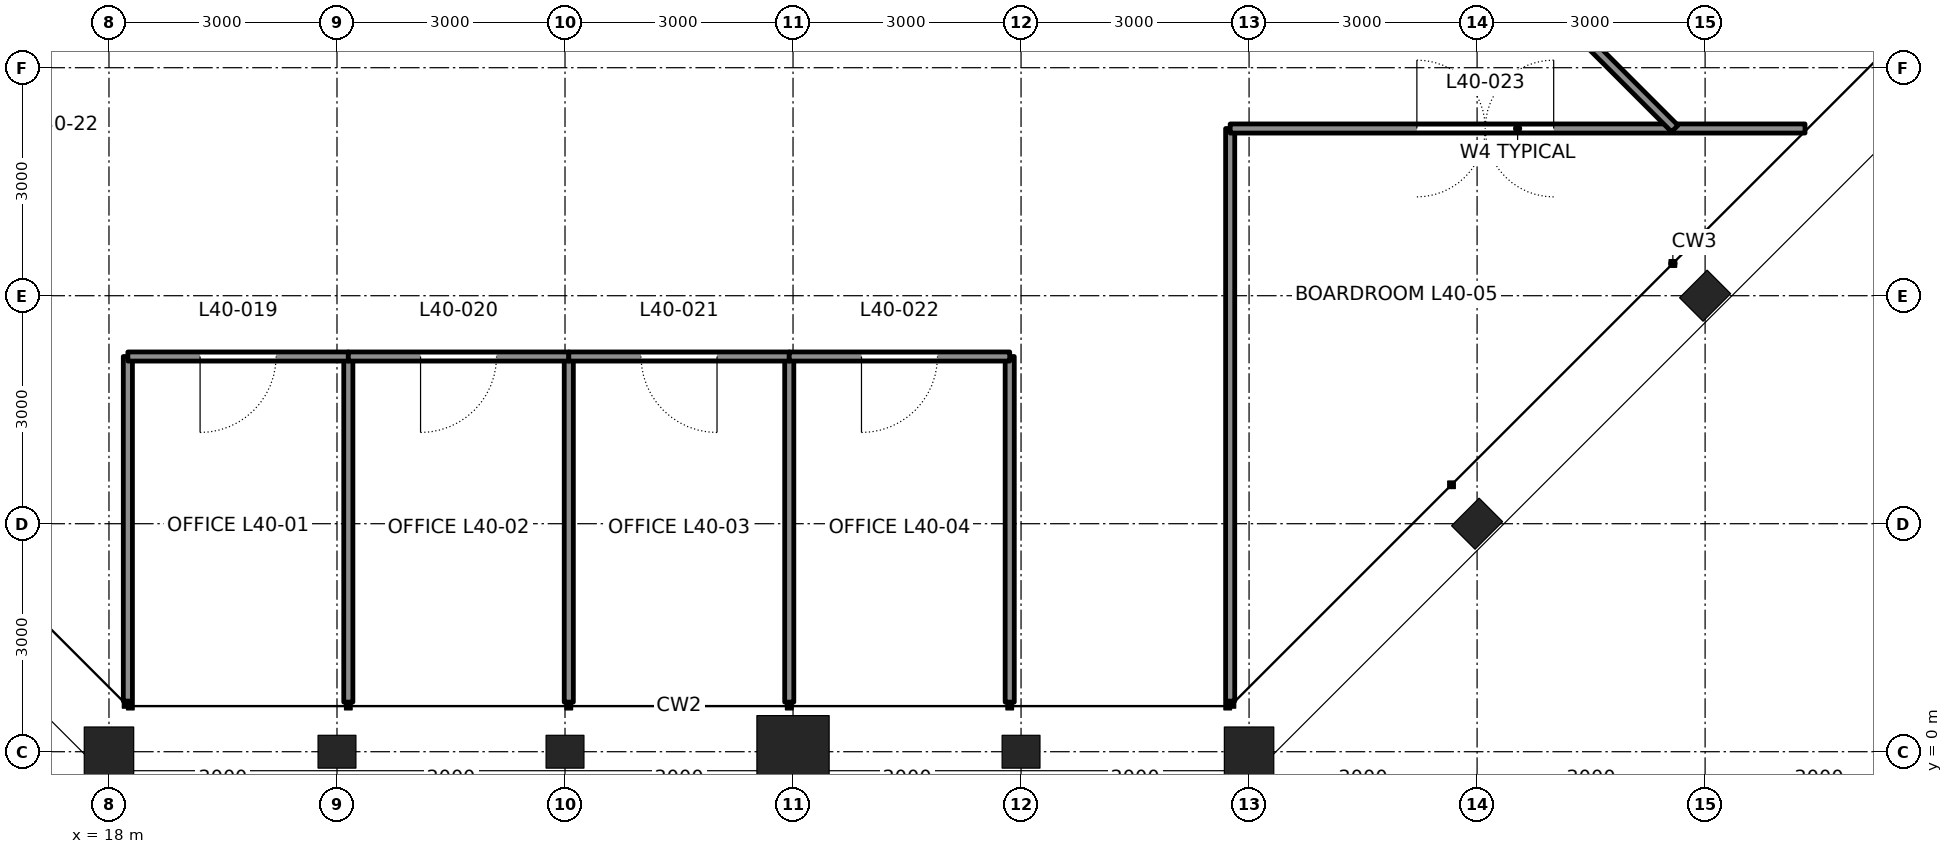
"""IFC4 building model, lengths in metres.
Left out: names, types, materials, properties, quantities, classifications, styles, units other than length and angle.
Written with IfcOpenShell. Run it as: python <this file> out.ifc"""

import sys

from ifc_helpers import new_model, si_unit, direction, frame, frame_2d, origin, origin_2d, place, context, subcontext, project, spatial, rectangle, hollow_rectangle, i_section, extrude, element, fill, save


model = new_model("IFC4")
c1 = context("Model", 3, precision=1e-05, world=origin(), true_north=direction((0.0, 1.0)))
c2 = subcontext(c1, "Body", "Model", "MODEL_VIEW")
j1 = project(units=[si_unit("LENGTHUNIT", "METRE"), si_unit("PLANEANGLEUNIT", "RADIAN")], contexts=[c1])
p1 = place(None, origin())
s1 = spatial("IfcSite", under=j1, at=p1, CompositionType="ELEMENT")
p2 = place(p1, origin())
s2 = spatial("IfcBuilding", under=s1, at=p2, CompositionType="ELEMENT")
p3 = place(p2, frame((0.0, 0.0, 184.5)))
s3 = spatial("IfcBuildingStorey", under=s2, at=p3, CompositionType="ELEMENT", Elevation=184.5)
p4 = place(p3, frame((18.0, 0.0, 0.0), z_axis=(0.0, 0.0, 1.0), x_axis=(0.0, -1.0, 0.0)))
e1 = element("IfcColumn", 1, at=p4, inside=s3, PredefinedType="COLUMN", context=c2, shape_type="SweptSolid", body=[
    extrude(hollow_rectangle(XDim=0.65, YDim=0.65, WallThickness=0.065, at=origin_2d()), origin(), (0.0, 0.0, 1.0), 4.2),
])
for number, where, z_axis, x_axis in (
    (2, (21.0, 0.0, 0.0), (0.0, 0.0, 1.0), (0.0, -1.0, 0.0)),
    (3, (24.0, 0.0, 0.0), (0.0, 0.0, 1.0), (0.0, -1.0, 0.0)),
):
    element("IfcColumn", number, at=place(p3, frame(where, z_axis=z_axis, x_axis=x_axis)), inside=s3, PredefinedType="COLUMN", context=c2, shape_type="SweptSolid", body=[
        extrude(i_section(OverallWidth=0.432, OverallDepth=0.498, WebThickness=0.056, FlangeThickness=0.089, at=origin_2d()), origin(), (0.0, 0.0, 1.0), 4.2),
    ])
p5 = place(p3, frame((27.0, 0.0, 0.0), z_axis=(0.0, 0.0, 1.0), x_axis=(0.0, -1.0, 0.0)))
e4 = element("IfcColumn", 4, at=p5, inside=s3, PredefinedType="COLUMN", context=c2, shape_type="SweptSolid", body=[
    extrude(hollow_rectangle(XDim=0.95, YDim=0.95, WallThickness=0.11, at=origin_2d()), origin(), (0.0, 0.0, 1.0), 4.2),
])
p6 = place(p3, frame((30.0, 0.0, 0.0), z_axis=(0.0, 0.0, 1.0), x_axis=(0.0, -1.0, 0.0)))
e5 = element("IfcColumn", 5, at=p6, inside=s3, PredefinedType="COLUMN", context=c2, shape_type="SweptSolid", body=[
    extrude(i_section(OverallWidth=0.432, OverallDepth=0.498, WebThickness=0.056, FlangeThickness=0.089, at=origin_2d()), origin(), (0.0, 0.0, 1.0), 4.2),
])
p7 = place(p3, frame((33.0, 0.0, 0.0), z_axis=(0.0, 0.0, 1.0), x_axis=(0.0, -1.0, 0.0)))
e6 = element("IfcColumn", 6, at=p7, inside=s3, PredefinedType="COLUMN", context=c2, shape_type="SweptSolid", body=[
    extrude(hollow_rectangle(XDim=0.65, YDim=0.65, WallThickness=0.065, at=origin_2d()), origin(), (0.0, 0.0, 1.0), 4.2),
])
for number, where, z_axis, x_axis in (
    (7, (36.0, 3.0, 0.0), (0.0, 0.0, 1.0), (0.707, -0.707, 0.0)),
    (8, (39.0, 6.0, 0.0), (0.0, 0.0, 1.0), (0.707, -0.707, 0.0)),
):
    element("IfcColumn", number, at=place(p3, frame(where, z_axis=z_axis, x_axis=x_axis)), inside=s3, PredefinedType="COLUMN", context=c2, shape_type="SweptSolid", body=[
        extrude(i_section(OverallWidth=0.437, OverallDepth=0.513, WebThickness=0.061, FlangeThickness=0.097, at=origin_2d()), origin(), (0.0, 0.0, 1.0), 4.2),
    ])
p8 = place(p3, frame((18.249, 0.666, 0.0), z_axis=(0.0, 0.0, 1.0), x_axis=(0.0, 1.0, 0.0)))
e9 = element("IfcWall", 9, at=p8, inside=s3, PredefinedType="PARTITIONING", context=c2, shape_type="SweptSolid", body=[
    extrude(rectangle(XDim=4.534, YDim=0.12, at=frame_2d((2.267, 0.0))), origin(), (0.0, 0.0, 1.0), 4.04),
])
p9 = place(p3, frame((21.149, 0.653, 0.0), z_axis=(0.0, 0.0, 1.0), x_axis=(0.0, 1.0, 0.0)))
e10 = element("IfcWall", 10, at=p9, inside=s3, PredefinedType="PARTITIONING", context=c2, shape_type="SweptSolid", body=[
    extrude(rectangle(XDim=4.547, YDim=0.12, at=frame_2d((2.274, 0.0))), origin(), (0.0, 0.0, 1.0), 4.04),
])
for number, where, z_axis, x_axis in (
    (11, (24.05, 0.653, 0.0), (0.0, 0.0, 1.0), (0.0, 1.0, 0.0)),
    (12, (26.95, 0.653, 0.0), (0.0, 0.0, 1.0), (0.0, 1.0, 0.0)),
):
    element("IfcWall", number, at=place(p3, frame(where, z_axis=z_axis, x_axis=x_axis)), inside=s3, PredefinedType="PARTITIONING", context=c2, shape_type="SweptSolid", body=[
        extrude(rectangle(XDim=4.547, YDim=0.12, at=frame_2d((2.274, 0.0))), origin(), (0.0, 0.0, 1.0), 3.357),
    ])
p10 = place(p3, frame((29.851, 0.653, 0.0), z_axis=(0.0, 0.0, 1.0), x_axis=(0.0, 1.0, 0.0)))
e13 = element("IfcWall", 13, at=p10, inside=s3, PredefinedType="PARTITIONING", context=c2, shape_type="SweptSolid", body=[
    extrude(rectangle(XDim=4.547, YDim=0.12, at=frame_2d((2.274, 0.0))), origin(), (0.0, 0.0, 1.0), 4.04),
])
p11 = place(p3, frame((32.751, 0.666, 0.0), z_axis=(0.0, 0.0, 1.0), x_axis=(0.0, 1.0, 0.0)))
e14 = element("IfcWall", 14, at=p11, inside=s3, PredefinedType="PARTITIONING", context=c2, shape_type="SweptSolid", body=[
    extrude(rectangle(XDim=7.534, YDim=0.12, at=frame_2d((3.767, 0.0))), origin(), (0.0, 0.0, 1.0), 4.04),
])
p12 = place(p3, frame((18.249, 5.2, 0.0), z_axis=(0.0, 0.0, 1.0), x_axis=(1.0, 0.0, 0.0)))
e15 = element("IfcWall", 15, at=p12, inside=s3, PredefinedType="PARTITIONING", context=c2, shape_type="SweptSolid", body=[
    extrude(rectangle(XDim=2.901, YDim=0.12, at=frame_2d((1.45, 0.0))), origin(), (0.0, 0.0, 1.0), 4.04),
])
p13 = place(p12, frame((0.95, 0.0, 0.0)))
e16 = element("IfcOpeningElement", 16, at=p13, cuts=e15, PredefinedType="OPENING", context=c2, shape_type="SweptSolid", body=[
    extrude(rectangle(XDim=1.0, YDim=2.4, at=frame_2d((0.5, 1.2))), frame((0.0, 0.07, 0.0), z_axis=(0.0, -1.0, 0.0), x_axis=(1.0, 0.0, 0.0)), (0.0, 0.0, 1.0), 0.14),
])
p14 = place(p3, frame((21.149, 5.2, 0.0), z_axis=(0.0, 0.0, 1.0), x_axis=(1.0, 0.0, 0.0)))
e17 = element("IfcWall", 17, at=p14, inside=s3, PredefinedType="PARTITIONING", context=c2, shape_type="SweptSolid", body=[
    extrude(rectangle(XDim=2.901, YDim=0.12, at=frame_2d((1.45, 0.0))), origin(), (0.0, 0.0, 1.0), 4.04),
])
p15 = place(p14, frame((0.95, 0.0, 0.0)))
e18 = element("IfcOpeningElement", 18, at=p15, cuts=e17, PredefinedType="OPENING", context=c2, shape_type="SweptSolid", body=[
    extrude(rectangle(XDim=1.0, YDim=2.4, at=frame_2d((0.5, 1.2))), frame((0.0, 0.07, 0.0), z_axis=(0.0, -1.0, 0.0), x_axis=(1.0, 0.0, 0.0)), (0.0, 0.0, 1.0), 0.14),
])
p16 = place(p3, frame((24.05, 5.2, 0.0), z_axis=(0.0, 0.0, 1.0), x_axis=(1.0, 0.0, 0.0)))
e19 = element("IfcWall", 19, at=p16, inside=s3, PredefinedType="PARTITIONING", context=c2, shape_type="SweptSolid", body=[
    extrude(rectangle(XDim=2.9, YDim=0.12, at=frame_2d((1.45, 0.0))), origin(), (0.0, 0.0, 1.0), 4.04),
])
p17 = place(p16, frame((0.95, 0.0, 0.0)))
e20 = element("IfcOpeningElement", 20, at=p17, cuts=e19, PredefinedType="OPENING", context=c2, shape_type="SweptSolid", body=[
    extrude(rectangle(XDim=1.0, YDim=2.4, at=frame_2d((0.5, 1.2))), frame((0.0, 0.07, 0.0), z_axis=(0.0, -1.0, 0.0), x_axis=(1.0, 0.0, 0.0)), (0.0, 0.0, 1.0), 0.14),
])
p18 = place(p3, frame((26.95, 5.2, 0.0), z_axis=(0.0, 0.0, 1.0), x_axis=(1.0, 0.0, 0.0)))
e21 = element("IfcWall", 21, at=p18, inside=s3, PredefinedType="PARTITIONING", context=c2, shape_type="SweptSolid", body=[
    extrude(rectangle(XDim=2.901, YDim=0.12, at=frame_2d((1.45, 0.0))), origin(), (0.0, 0.0, 1.0), 4.04),
])
p19 = place(p18, frame((0.95, 0.0, 0.0)))
e22 = element("IfcOpeningElement", 22, at=p19, cuts=e21, PredefinedType="OPENING", context=c2, shape_type="SweptSolid", body=[
    extrude(rectangle(XDim=1.0, YDim=2.4, at=frame_2d((0.5, 1.2))), frame((0.0, 0.07, 0.0), z_axis=(0.0, -1.0, 0.0), x_axis=(1.0, 0.0, 0.0)), (0.0, 0.0, 1.0), 0.14),
])
p20 = place(p3, frame((32.751, 8.2, 0.0), z_axis=(0.0, 0.0, 1.0), x_axis=(1.0, 0.0, 0.0)))
e23 = element("IfcWall", 23, at=p20, inside=s3, PredefinedType="PARTITIONING", context=c2, shape_type="SweptSolid", body=[
    extrude(rectangle(XDim=7.563, YDim=0.12, at=frame_2d((3.781, 0.0))), origin(), (0.0, 0.0, 1.0), 4.04),
])
p21 = place(p20, frame((2.456, 0.0, 0.0)))
e24 = element("IfcOpeningElement", 24, at=p21, cuts=e23, PredefinedType="OPENING", context=c2, shape_type="SweptSolid", body=[
    extrude(rectangle(XDim=1.8, YDim=2.4, at=frame_2d((0.9, 1.2))), frame((0.0, 0.07, 0.0), z_axis=(0.0, -1.0, 0.0), x_axis=(1.0, 0.0, 0.0)), (0.0, 0.0, 1.0), 0.14),
])
p22 = place(p3, frame((34.8, 12.0, 0.0), z_axis=(0.0, 0.0, 1.0), x_axis=(0.707106781187, -0.707106781187, 0.0)))
e25 = element("IfcWall", 25, at=p22, inside=s3, PredefinedType="PARTITIONING", context=c2, shape_type="SweptSolid", body=[
    extrude(rectangle(XDim=5.375, YDim=0.12, at=frame_2d((2.688, 0.0))), origin(), (0.0, 0.0, 1.0), 4.04),
])
p23 = place(p22, frame((1.3, 0.0, 0.0)))
e26 = element("IfcOpeningElement", 26, at=p23, cuts=e25, PredefinedType="OPENING", context=c2, shape_type="SweptSolid", body=[
    extrude(rectangle(XDim=1.0, YDim=2.4, at=frame_2d((0.5, 1.2))), frame((0.0, 0.07, 0.0), z_axis=(0.0, -1.0, 0.0), x_axis=(1.0, 0.0, 0.0)), (0.0, 0.0, 1.0), 0.14),
])
p24 = place(p13, frame((1.0, 0.0, 0.0), z_axis=(0.0, 0.0, 1.0), x_axis=(-1.0, 0.0, 0.0)))
e27 = element("IfcDoor", 27, at=p24, inside=s3, OperationType="SINGLE_SWING_RIGHT", PredefinedType="DOOR", context=c2, shape_type="SweptSolid", body=[
    extrude(rectangle(XDim=1.0, YDim=2.4, at=frame_2d((0.5, 1.2))), frame((0.0, 0.025, 0.0), z_axis=(0.0, -1.0, 0.0), x_axis=(1.0, 0.0, 0.0)), (0.0, 0.0, 1.0), 0.05),
])
fill(e16, e27)
p25 = place(p15, frame((1.0, 0.0, 0.0), z_axis=(0.0, 0.0, 1.0), x_axis=(-1.0, 0.0, 0.0)))
e28 = element("IfcDoor", 28, at=p25, inside=s3, OperationType="SINGLE_SWING_RIGHT", PredefinedType="DOOR", context=c2, shape_type="SweptSolid", body=[
    extrude(rectangle(XDim=1.0, YDim=2.4, at=frame_2d((0.5, 1.2))), frame((0.0, 0.025, 0.0), z_axis=(0.0, -1.0, 0.0), x_axis=(1.0, 0.0, 0.0)), (0.0, 0.0, 1.0), 0.05),
])
fill(e18, e28)
p26 = place(p17, frame((1.0, 0.0, 0.0), z_axis=(0.0, 0.0, 1.0), x_axis=(-1.0, 0.0, 0.0)))
e29 = element("IfcDoor", 29, at=p26, inside=s3, OperationType="SINGLE_SWING_LEFT", PredefinedType="DOOR", context=c2, shape_type="SweptSolid", body=[
    extrude(rectangle(XDim=1.0, YDim=2.4, at=frame_2d((0.5, 1.2))), frame((0.0, 0.025, 0.0), z_axis=(0.0, -1.0, 0.0), x_axis=(1.0, 0.0, 0.0)), (0.0, 0.0, 1.0), 0.05),
])
fill(e20, e29)
p27 = place(p19, frame((1.0, 0.0, 0.0), z_axis=(0.0, 0.0, 1.0), x_axis=(-1.0, 0.0, 0.0)))
e30 = element("IfcDoor", 30, at=p27, inside=s3, OperationType="SINGLE_SWING_RIGHT", PredefinedType="DOOR", context=c2, shape_type="SweptSolid", body=[
    extrude(rectangle(XDim=1.0, YDim=2.4, at=frame_2d((0.5, 1.2))), frame((0.0, 0.025, 0.0), z_axis=(0.0, -1.0, 0.0), x_axis=(1.0, 0.0, 0.0)), (0.0, 0.0, 1.0), 0.05),
])
fill(e22, e30)
p28 = place(p21, origin())
e31 = element("IfcDoor", 31, at=p28, inside=s3, OperationType="DOUBLE_DOOR_DOUBLE_SWING", PredefinedType="DOOR", context=c2, shape_type="SweptSolid", body=[
    extrude(rectangle(XDim=1.8, YDim=2.4, at=frame_2d((0.9, 1.2))), frame((0.0, 0.025, 0.0), z_axis=(0.0, -1.0, 0.0), x_axis=(1.0, 0.0, 0.0)), (0.0, 0.0, 1.0), 0.05),
])
fill(e24, e31)
save(model, sys.argv[1])
